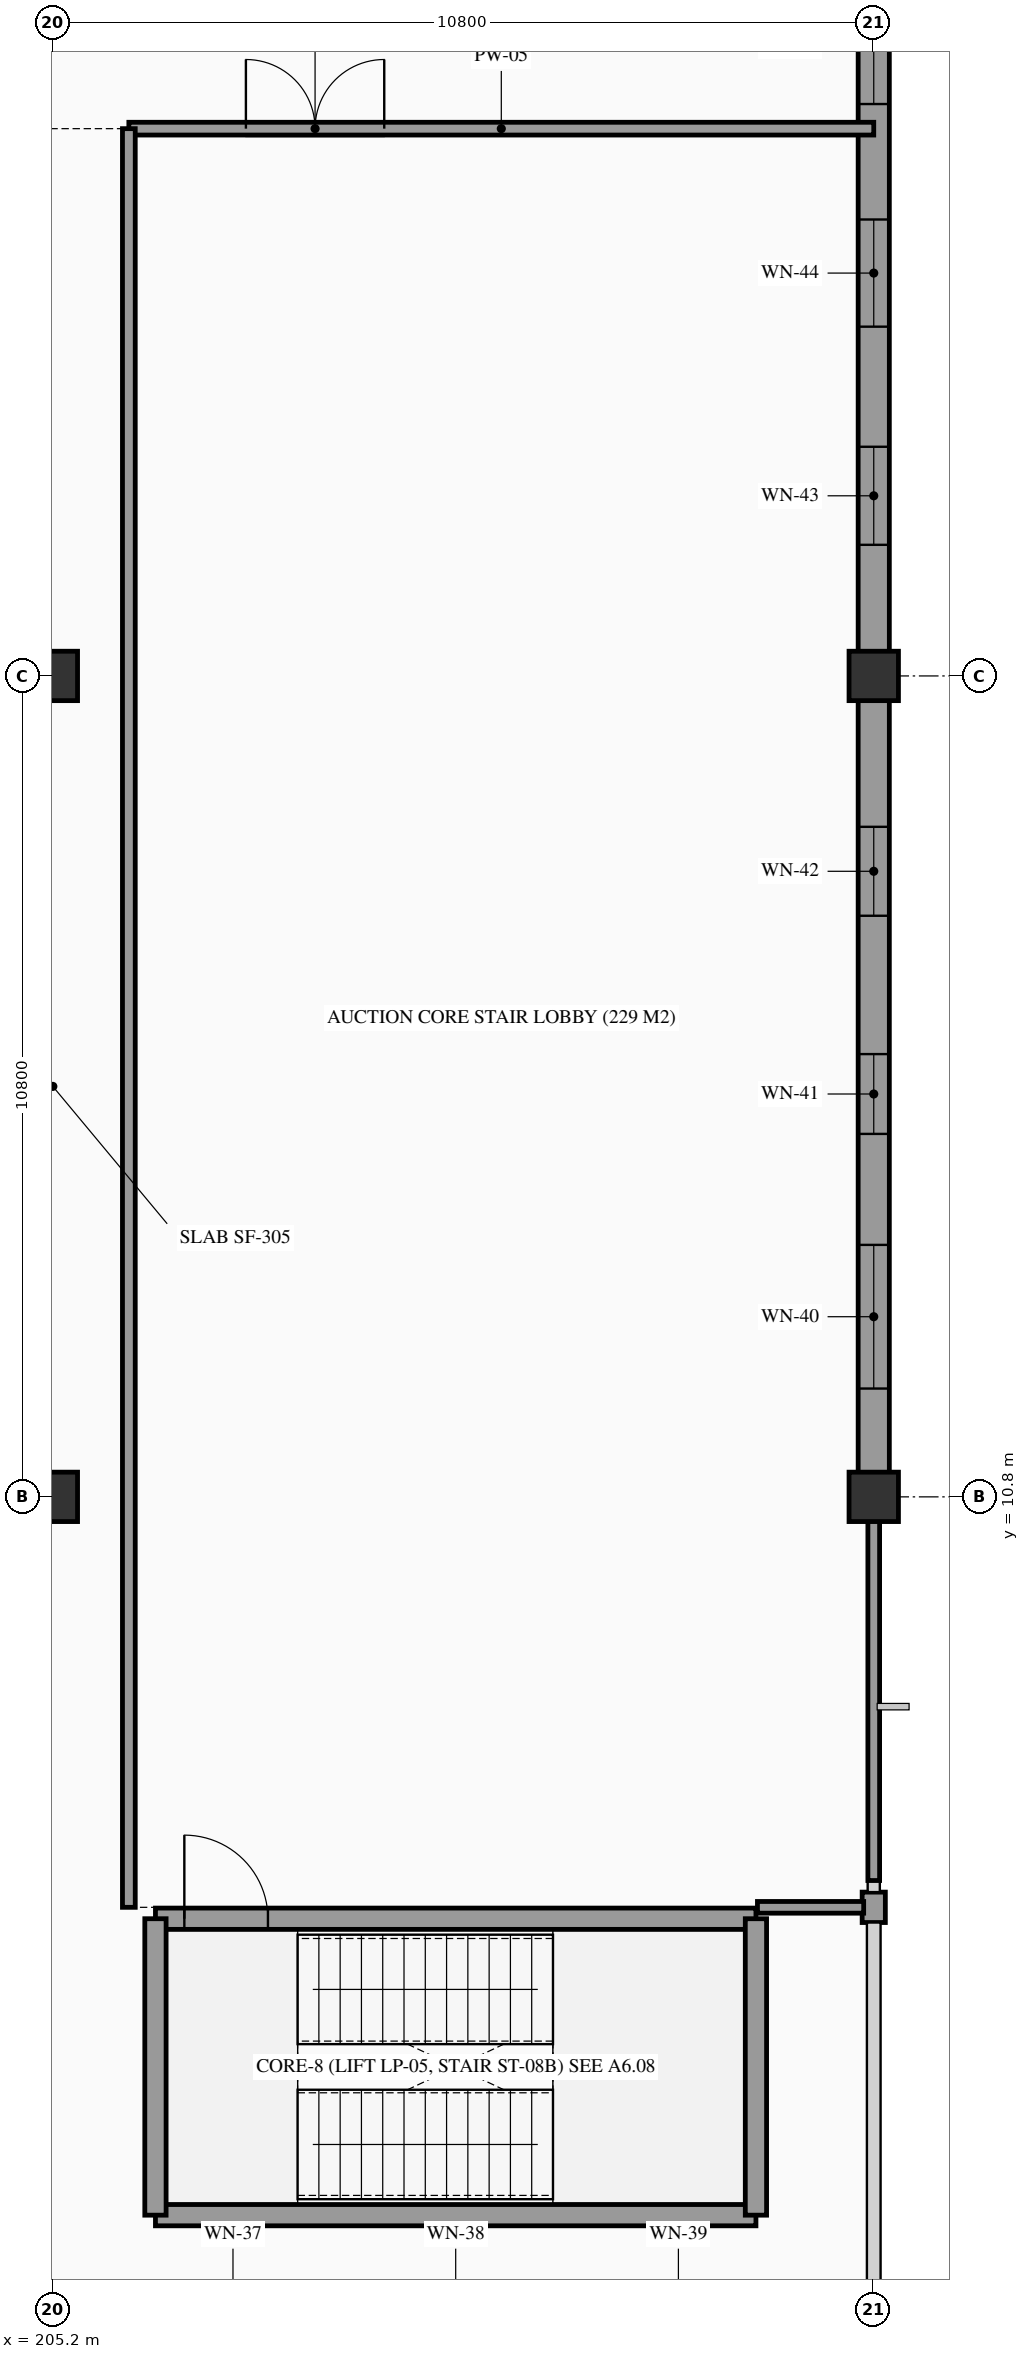
"""IFC4 building model, lengths in metres.
Left out: names, types, materials, properties, quantities, classifications, styles, units other than length and angle.
Written with IfcOpenShell. Run it as: python <this file> out.ifc"""

import sys

from ifc_helpers import new_model, si_unit, direction, frame, frame_2d, origin, origin_2d, place, context, subcontext, project, spatial, rectangle, extrude, element, fill, save


model = new_model("IFC4")
c1 = context("Model", 3, precision=1e-05, world=origin(), true_north=direction((0.0, 1.0)))
c2 = subcontext(c1, "Body", "Model", "MODEL_VIEW")
j1 = project(units=[si_unit("LENGTHUNIT", "METRE"), si_unit("PLANEANGLEUNIT", "RADIAN")], contexts=[c1])
p1 = place(None, origin())
s1 = spatial("IfcSite", under=j1, at=p1, CompositionType="ELEMENT")
p2 = place(p1, origin())
s2 = spatial("IfcBuilding", under=s1, at=p2, CompositionType="ELEMENT")
p3 = place(p2, frame((0.0, 0.0, 5.4)))
s3 = spatial("IfcBuildingStorey", under=s2, at=p3, CompositionType="ELEMENT", Elevation=5.4)
for number, where, z_axis, x_axis in (
    (1, (205.2, 10.8, 0.0), (0.0, 0.0, 1.0), (1.0, 0.0, 0.0)),
    (2, (205.2, 21.6, 0.0), (0.0, 0.0, 1.0), (1.0, 0.0, 0.0)),
    (3, (216.0, 10.8, 0.0), (0.0, 0.0, 1.0), (1.0, 0.0, 0.0)),
    (4, (216.0, 21.6, 0.0), (0.0, 0.0, 1.0), (1.0, 0.0, 0.0)),
):
    element("IfcColumn", number, at=place(p3, frame(where, z_axis=z_axis, x_axis=x_axis)), inside=s3, PredefinedType="COLUMN", context=c2, shape_type="SweptSolid", body=[
        extrude(rectangle(XDim=0.65, YDim=0.65, at=origin_2d()), origin(), (0.0, 0.0, 1.0), 4.68),
    ])
p4 = place(p3, frame((216.0, 5.2, 0.0), z_axis=(0.0, 0.0, 1.0), x_axis=(0.0, 1.0, 0.0)))
e5 = element("IfcWall", 5, at=p4, inside=s3, PredefinedType="STANDARD", context=c2, shape_type="SweptSolid", body=[
    extrude(rectangle(XDim=0.4, YDim=0.305, at=frame_2d((0.2, 0.0))), origin(), (0.0, 0.0, 1.0), 3.53),
])
p5 = place(p3, frame((216.0, 11.12, 0.0), z_axis=(0.0, 0.0, 1.0), x_axis=(0.0, 1.0, 0.0)))
e6 = element("IfcWall", 6, at=p5, inside=s3, PredefinedType="STANDARD", context=c2, shape_type="SweptSolid", body=[
    extrude(rectangle(XDim=10.16, YDim=0.41, at=frame_2d((5.08, 0.0))), origin(), (0.0, 0.0, 1.0), 3.53),
])
p6 = place(p5, frame((1.105, 0.0, 0.95)))
e7 = element("IfcOpeningElement", 7, at=p6, cuts=e6, PredefinedType="OPENING", context=c2, shape_type="SweptSolid", body=[
    extrude(rectangle(XDim=1.89, YDim=1.5, at=frame_2d((0.945, 0.75))), frame((0.0, 0.215, 0.0), z_axis=(0.0, -1.0, 0.0), x_axis=(1.0, 0.0, 0.0)), (0.0, 0.0, 1.0), 0.43),
])
p7 = place(p5, frame((4.455, 0.0, 0.95)))
e8 = element("IfcOpeningElement", 8, at=p7, cuts=e6, PredefinedType="OPENING", context=c2, shape_type="SweptSolid", body=[
    extrude(rectangle(XDim=1.05, YDim=1.65, at=frame_2d((0.525, 0.825))), frame((0.0, 0.215, 0.0), z_axis=(0.0, -1.0, 0.0), x_axis=(1.0, 0.0, 0.0)), (0.0, 0.0, 1.0), 0.43),
])
p8 = place(p5, frame((7.325, 0.0, 0.95)))
e9 = element("IfcOpeningElement", 9, at=p8, cuts=e6, PredefinedType="OPENING", context=c2, shape_type="SweptSolid", body=[
    extrude(rectangle(XDim=1.17, YDim=1.65, at=frame_2d((0.585, 0.825))), frame((0.0, 0.215, 0.0), z_axis=(0.0, -1.0, 0.0), x_axis=(1.0, 0.0, 0.0)), (0.0, 0.0, 1.0), 0.43),
])
p9 = place(p3, frame((216.0, 21.92, 0.0), z_axis=(0.0, 0.0, 1.0), x_axis=(0.0, 1.0, 0.0)))
e10 = element("IfcWall", 10, at=p9, inside=s3, PredefinedType="STANDARD", context=c2, shape_type="SweptSolid", body=[
    extrude(rectangle(XDim=10.16, YDim=0.41, at=frame_2d((5.08, 0.0))), origin(), (0.0, 0.0, 1.0), 3.53),
])
p10 = place(p9, frame((1.405, 0.0, 0.95)))
e11 = element("IfcOpeningElement", 11, at=p10, cuts=e10, PredefinedType="OPENING", context=c2, shape_type="SweptSolid", body=[
    extrude(rectangle(XDim=1.29, YDim=1.65, at=frame_2d((0.645, 0.825))), frame((0.0, 0.215, 0.0), z_axis=(0.0, -1.0, 0.0), x_axis=(1.0, 0.0, 0.0)), (0.0, 0.0, 1.0), 0.43),
])
p11 = place(p9, frame((4.275, 0.0, 0.95)))
e12 = element("IfcOpeningElement", 12, at=p11, cuts=e10, PredefinedType="OPENING", context=c2, shape_type="SweptSolid", body=[
    extrude(rectangle(XDim=1.41, YDim=1.65, at=frame_2d((0.705, 0.825))), frame((0.0, 0.215, 0.0), z_axis=(0.0, -1.0, 0.0), x_axis=(1.0, 0.0, 0.0)), (0.0, 0.0, 1.0), 0.43),
])
p12 = place(p9, frame((7.204, 0.0, 0.95)))
e13 = element("IfcOpeningElement", 13, at=p12, cuts=e10, PredefinedType="OPENING", context=c2, shape_type="SweptSolid", body=[
    extrude(rectangle(XDim=1.53, YDim=1.65, at=frame_2d((0.765, 0.825))), frame((0.0, 0.215, 0.0), z_axis=(0.0, -1.0, 0.0), x_axis=(1.0, 0.0, 0.0)), (0.0, 0.0, 1.0), 0.43),
])
p13 = place(p3, frame((206.55, 1.35, 0.0), z_axis=(0.0, 0.0, 1.0), x_axis=(1.0, 0.0, 0.0)))
e14 = element("IfcWall", 14, at=p13, inside=s3, PredefinedType="SHEAR", context=c2, shape_type="SweptSolid", body=[
    extrude(rectangle(XDim=7.9, YDim=0.28, at=frame_2d((3.95, 0.0))), origin(), (0.0, 0.0, 1.0), 4.68),
])
p14 = place(p3, frame((206.55, 5.25, 0.0), z_axis=(0.0, 0.0, 1.0), x_axis=(1.0, 0.0, 0.0)))
e15 = element("IfcWall", 15, at=p14, inside=s3, PredefinedType="SHEAR", context=c2, shape_type="SweptSolid", body=[
    extrude(rectangle(XDim=7.9, YDim=0.28, at=frame_2d((3.95, 0.0))), origin(), (0.0, 0.0, 1.0), 4.68),
])
p15 = place(p14, frame((0.38, 0.0, 0.0)))
e16 = element("IfcOpeningElement", 16, at=p15, cuts=e15, PredefinedType="OPENING", context=c2, shape_type="SweptSolid", body=[
    extrude(rectangle(XDim=1.1, YDim=2.2, at=frame_2d((0.55, 1.1))), frame((0.0, 0.15, 0.0), z_axis=(0.0, -1.0, 0.0), x_axis=(1.0, 0.0, 0.0)), (0.0, 0.0, 1.0), 0.3),
])
for number, where, z_axis, x_axis in (
    (17, (206.55, 1.35, 0.0), (0.0, 0.0, 1.0), (0.0, 1.0, 0.0)),
    (18, (214.45, 1.35, 0.0), (0.0, 0.0, 1.0), (0.0, 1.0, 0.0)),
):
    element("IfcWall", number, at=place(p3, frame(where, z_axis=z_axis, x_axis=x_axis)), inside=s3, PredefinedType="SHEAR", context=c2, shape_type="SweptSolid", body=[
        extrude(rectangle(XDim=3.9, YDim=0.28, at=frame_2d((1.95, 0.0))), origin(), (0.0, 0.0, 1.0), 4.68),
    ])
p16 = place(p3, frame((206.2, 28.8, 0.0), z_axis=(0.0, 0.0, 1.0), x_axis=(1.0, 0.0, 0.0)))
e19 = element("IfcWall", 19, at=p16, inside=s3, PredefinedType="PARTITIONING", context=c2, shape_type="SweptSolid", body=[
    extrude(rectangle(XDim=9.8, YDim=0.168, at=frame_2d((4.9, 0.0))), origin(), (0.0, 0.0, 1.0), 3.23),
])
p17 = place(p16, frame((1.54, 0.0, 0.0)))
e20 = element("IfcOpeningElement", 20, at=p17, cuts=e19, PredefinedType="OPENING", context=c2, shape_type="SweptSolid", body=[
    extrude(rectangle(XDim=1.82, YDim=2.25, at=frame_2d((0.91, 1.125))), frame((0.0, 0.094, 0.0), z_axis=(0.0, -1.0, 0.0), x_axis=(1.0, 0.0, 0.0)), (0.0, 0.0, 1.0), 0.188),
])
p18 = place(p3, frame((214.47, 5.4, 0.0), z_axis=(0.0, 0.0, 1.0), x_axis=(1.0, 0.0, 0.0)))
e21 = element("IfcWall", 21, at=p18, inside=s3, PredefinedType="PARTITIONING", context=c2, shape_type="SweptSolid", body=[
    extrude(rectangle(XDim=1.397, YDim=0.154, at=frame_2d((0.699, 0.0))), origin(), (0.0, 0.0, 1.0), 3.23),
])
p19 = place(p3, frame((206.2, 5.4, 0.0), z_axis=(0.0, 0.0, 1.0), x_axis=(0.0, 1.0, 0.0)))
e22 = element("IfcWall", 22, at=p19, inside=s3, PredefinedType="PARTITIONING", context=c2, shape_type="SweptSolid", body=[
    extrude(rectangle(XDim=23.4, YDim=0.168, at=frame_2d((11.7, 0.0))), origin(), (0.0, 0.0, 1.0), 3.23),
])
p20 = place(p3, frame((216.0, 5.752, 0.0), z_axis=(0.0, 0.0, 1.0), x_axis=(0.0, 1.0, 0.0)))
e23 = element("IfcWall", 23, at=p20, inside=s3, PredefinedType="PARTITIONING", context=c2, shape_type="SweptSolid", body=[
    extrude(rectangle(XDim=5.348, YDim=0.154, at=frame_2d((2.674, 0.0))), origin(), (0.0, 0.0, 1.0), 3.23),
])
p21 = place(p3, frame((216.0, 21.3, 0.0), z_axis=(0.0, 0.0, 1.0), x_axis=(0.0, 1.0, 0.0)))
e24 = element("IfcWall", 24, at=p21, inside=s3, PredefinedType="PARTITIONING", context=c2, shape_type="SweptSolid", body=[
    extrude(rectangle(XDim=0.6, YDim=0.154, at=frame_2d((0.3, 0.0))), origin(), (0.0, 0.0, 1.0), 3.23),
])
p22 = place(p6, frame((1.89, 0.0, 0.0), z_axis=(0.0, 0.0, 1.0), x_axis=(-1.0, 0.0, 0.0)))
e25 = element("IfcWindow", 25, at=p22, inside=s3, PartitioningType="SINGLE_PANEL", PredefinedType="WINDOW", context=c2, shape_type="SweptSolid", body=[
    extrude(rectangle(XDim=1.89, YDim=1.5, at=frame_2d((0.945, 0.75))), frame((0.0, 0.03, 0.0), z_axis=(0.0, -1.0, 0.0), x_axis=(1.0, 0.0, 0.0)), (0.0, 0.0, 1.0), 0.06),
])
fill(e7, e25)
p23 = place(p7, frame((1.05, 0.0, 0.0), z_axis=(0.0, 0.0, 1.0), x_axis=(-1.0, 0.0, 0.0)))
e26 = element("IfcWindow", 26, at=p23, inside=s3, PartitioningType="SINGLE_PANEL", PredefinedType="WINDOW", context=c2, shape_type="SweptSolid", body=[
    extrude(rectangle(XDim=1.05, YDim=1.65, at=frame_2d((0.525, 0.825))), frame((0.0, 0.03, 0.0), z_axis=(0.0, -1.0, 0.0), x_axis=(1.0, 0.0, 0.0)), (0.0, 0.0, 1.0), 0.06),
])
fill(e8, e26)
p24 = place(p8, frame((1.17, 0.0, 0.0), z_axis=(0.0, 0.0, 1.0), x_axis=(-1.0, 0.0, 0.0)))
e27 = element("IfcWindow", 27, at=p24, inside=s3, PartitioningType="SINGLE_PANEL", PredefinedType="WINDOW", context=c2, shape_type="SweptSolid", body=[
    extrude(rectangle(XDim=1.17, YDim=1.65, at=frame_2d((0.585, 0.825))), frame((0.0, 0.03, 0.0), z_axis=(0.0, -1.0, 0.0), x_axis=(1.0, 0.0, 0.0)), (0.0, 0.0, 1.0), 0.06),
])
fill(e9, e27)
p25 = place(p10, frame((1.29, 0.0, 0.0), z_axis=(0.0, 0.0, 1.0), x_axis=(-1.0, 0.0, 0.0)))
e28 = element("IfcWindow", 28, at=p25, inside=s3, PartitioningType="SINGLE_PANEL", PredefinedType="WINDOW", context=c2, shape_type="SweptSolid", body=[
    extrude(rectangle(XDim=1.29, YDim=1.65, at=frame_2d((0.645, 0.825))), frame((0.0, 0.03, 0.0), z_axis=(0.0, -1.0, 0.0), x_axis=(1.0, 0.0, 0.0)), (0.0, 0.0, 1.0), 0.06),
])
fill(e11, e28)
p26 = place(p11, frame((1.41, 0.0, 0.0), z_axis=(0.0, 0.0, 1.0), x_axis=(-1.0, 0.0, 0.0)))
e29 = element("IfcWindow", 29, at=p26, inside=s3, PartitioningType="SINGLE_PANEL", PredefinedType="WINDOW", context=c2, shape_type="SweptSolid", body=[
    extrude(rectangle(XDim=1.41, YDim=1.65, at=frame_2d((0.705, 0.825))), frame((0.0, 0.03, 0.0), z_axis=(0.0, -1.0, 0.0), x_axis=(1.0, 0.0, 0.0)), (0.0, 0.0, 1.0), 0.06),
])
fill(e12, e29)
p27 = place(p12, frame((1.53, 0.0, 0.0), z_axis=(0.0, 0.0, 1.0), x_axis=(-1.0, 0.0, 0.0)))
e30 = element("IfcWindow", 30, at=p27, inside=s3, PartitioningType="SINGLE_PANEL", PredefinedType="WINDOW", context=c2, shape_type="SweptSolid", body=[
    extrude(rectangle(XDim=1.53, YDim=1.65, at=frame_2d((0.765, 0.825))), frame((0.0, 0.03, 0.0), z_axis=(0.0, -1.0, 0.0), x_axis=(1.0, 0.0, 0.0)), (0.0, 0.0, 1.0), 0.06),
])
fill(e13, e30)
p28 = place(p15, origin())
e31 = element("IfcDoor", 31, at=p28, inside=s3, OperationType="SINGLE_SWING_LEFT", PredefinedType="DOOR", context=c2, shape_type="SweptSolid", body=[
    extrude(rectangle(XDim=1.1, YDim=2.2, at=frame_2d((0.55, 1.1))), frame((0.0, 0.025, 0.0), z_axis=(0.0, -1.0, 0.0), x_axis=(1.0, 0.0, 0.0)), (0.0, 0.0, 1.0), 0.05),
])
fill(e16, e31)
p29 = place(p17, frame((1.82, 0.0, 0.0), z_axis=(0.0, 0.0, 1.0), x_axis=(-1.0, 0.0, 0.0)))
e32 = element("IfcDoor", 32, at=p29, inside=s3, OperationType="DOUBLE_DOOR_SINGLE_SWING", PredefinedType="DOOR", context=c2, shape_type="SweptSolid", body=[
    extrude(rectangle(XDim=1.82, YDim=2.25, at=frame_2d((0.91, 1.125))), frame((0.0, 0.025, 0.0), z_axis=(0.0, -1.0, 0.0), x_axis=(1.0, 0.0, 0.0)), (0.0, 0.0, 1.0), 0.05),
])
fill(e20, e32)
save(model, sys.argv[1])
